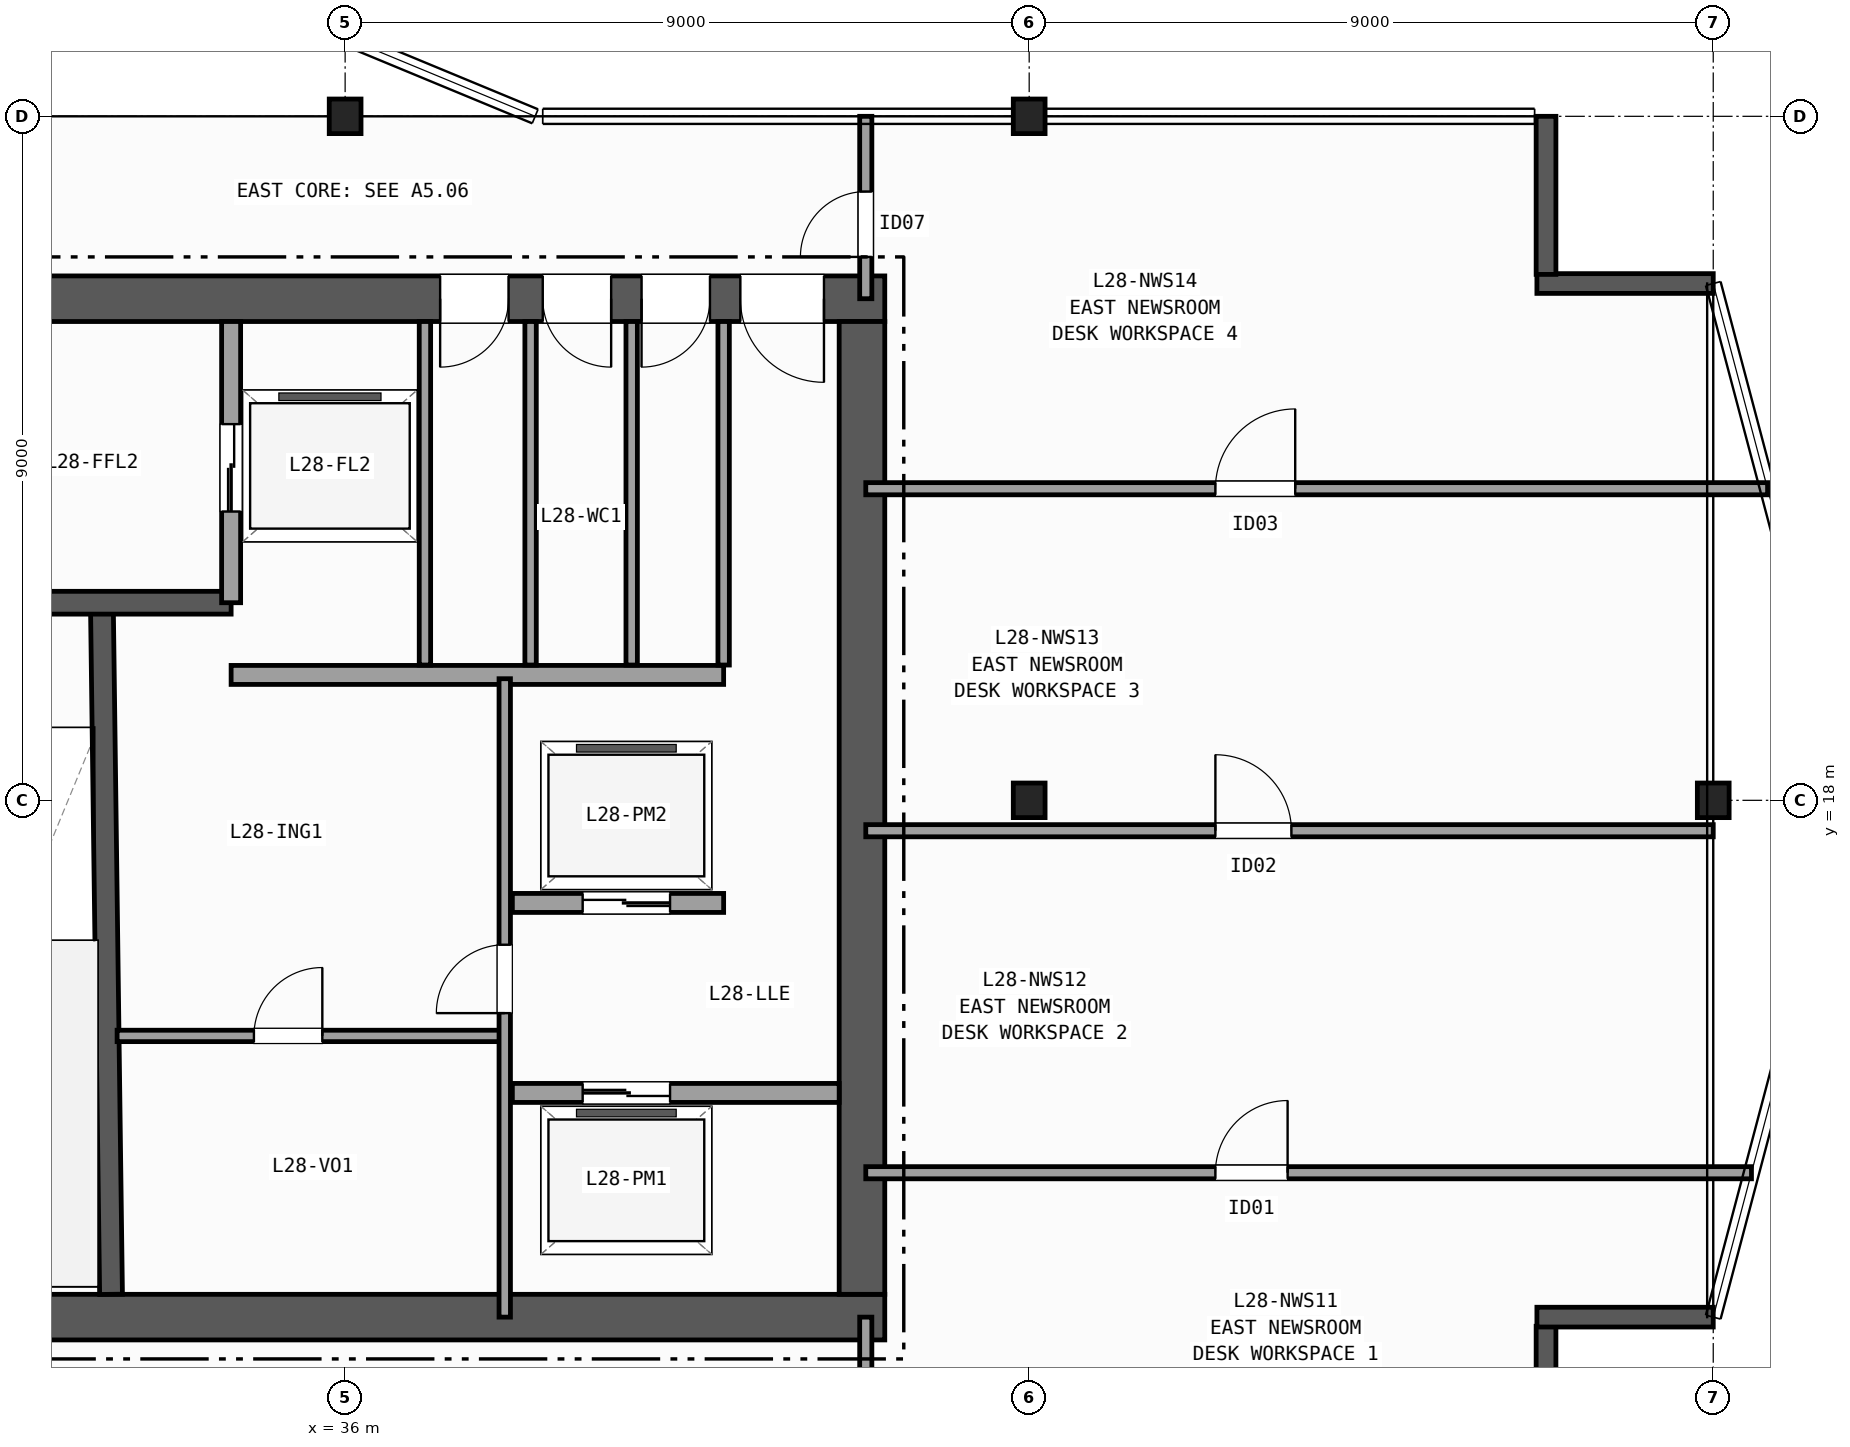
"""IFC4 building model, lengths in metres.
Left out: names, types, materials, properties, quantities, classifications, styles, units other than length and angle.
Written with IfcOpenShell. Run it as: python <this file> out.ifc"""

import sys

from ifc_helpers import new_model, si_unit, direction, frame, frame_2d, origin, origin_2d, place, context, subcontext, project, spatial, rectangle, i_section, extrude, element, fill, save


model = new_model("IFC4")
c1 = context("Model", 3, precision=1e-05, world=origin(), true_north=direction((0.0, 1.0)))
c2 = subcontext(c1, "Body", "Model", "MODEL_VIEW")
j1 = project(units=[si_unit("LENGTHUNIT", "METRE"), si_unit("PLANEANGLEUNIT", "RADIAN")], contexts=[c1])
p1 = place(None, origin())
s1 = spatial("IfcSite", under=j1, at=p1, CompositionType="ELEMENT")
p2 = place(p1, origin())
s2 = spatial("IfcBuilding", under=s1, at=p2, CompositionType="ELEMENT")
p3 = place(p2, frame((0.0, 0.0, 117.4)))
s3 = spatial("IfcBuildingStorey", under=s2, at=p3, CompositionType="ELEMENT", Elevation=117.4)
for number, where, z_axis, x_axis in (
    (1, (36.0, 27.0, 0.0), (0.0, 0.0, 1.0), (1.0, 0.0, 0.0)),
    (2, (45.0, 18.0, 0.0), (0.0, 0.0, 1.0), (1.0, 0.0, 0.0)),
    (3, (45.0, 27.0, 0.0), (0.0, 0.0, 1.0), (1.0, 0.0, 0.0)),
    (4, (54.0, 18.0, 0.0), (0.0, 0.0, 1.0), (1.0, 0.0, 0.0)),
):
    element("IfcColumn", number, at=place(p3, frame(where, z_axis=z_axis, x_axis=x_axis)), inside=s3, PredefinedType="COLUMN", context=c2, shape_type="SweptSolid", body=[
        extrude(i_section(OverallWidth=0.418, OverallDepth=0.455, WebThickness=0.042, FlangeThickness=0.068, FilletRadius=0.015, at=origin_2d()), origin(), (0.0, 0.0, 1.0), 3.7),
    ])
p4 = place(p3, frame((51.8, 9.0, 0.0), z_axis=(0.0, 0.0, 1.0), x_axis=(0.0, 1.0, 0.0)))
e5 = element("IfcWall", 5, at=p4, inside=s3, PredefinedType="SOLIDWALL", context=c2, shape_type="SweptSolid", body=[
    extrude(rectangle(XDim=2.08, YDim=0.26, at=frame_2d((1.04, 0.0))), origin(), (0.0, 0.0, 1.0), 3.42),
])
for number, where, z_axis, x_axis in (
    (6, (51.68, 11.2, 0.0), (0.0, 0.0, 1.0), (1.0, 0.0, 0.0)),
    (7, (54.0, 24.8, 0.0), (0.0, 0.0, 1.0), (-1.0, 0.0, 0.0)),
):
    element("IfcWall", number, at=place(p3, frame(where, z_axis=z_axis, x_axis=x_axis)), inside=s3, PredefinedType="SOLIDWALL", context=c2, shape_type="SweptSolid", body=[
        extrude(rectangle(XDim=2.32, YDim=0.26, at=frame_2d((1.16, 0.0))), origin(), (0.0, 0.0, 1.0), 3.42),
    ])
p5 = place(p3, frame((51.8, 24.92, 0.0), z_axis=(0.0, 0.0, 1.0), x_axis=(0.0, 1.0, 0.0)))
e8 = element("IfcWall", 8, at=p5, inside=s3, PredefinedType="SOLIDWALL", context=c2, shape_type="SweptSolid", body=[
    extrude(rectangle(XDim=2.08, YDim=0.26, at=frame_2d((1.04, 0.0))), origin(), (0.0, 0.0, 1.0), 3.42),
])
p6 = place(p3, frame((29.1, 11.2, 0.0), z_axis=(0.0, 0.0, 1.0), x_axis=(1.0, 0.0, 0.0)))
e9 = element("IfcWall", 9, at=p6, inside=s3, PredefinedType="SHEAR", context=c2, shape_type="SweptSolid", body=[
    extrude(rectangle(XDim=14.0, YDim=0.6, at=frame_2d((7.0, 0.0))), origin(), (0.0, 0.0, 1.0), 3.42),
])
p7 = place(p3, frame((43.1, 24.6, 0.0), z_axis=(0.0, 0.0, 1.0), x_axis=(-1.0, 0.0, 0.0)))
e10 = element("IfcWall", 10, at=p7, inside=s3, PredefinedType="SHEAR", context=c2, shape_type="SweptSolid", body=[
    extrude(rectangle(XDim=14.0, YDim=0.6, at=frame_2d((7.0, 0.0))), origin(), (0.0, 0.0, 1.0), 3.42),
])
p8 = place(p7, frame((0.8, 0.0, 0.0)))
e11 = element("IfcOpeningElement", 11, at=p8, cuts=e10, PredefinedType="OPENING", context=c2, shape_type="SweptSolid", body=[
    extrude(rectangle(XDim=1.1, YDim=2.15, at=frame_2d((0.55, 1.075))), frame((0.0, 0.31, 0.0), z_axis=(0.0, -1.0, 0.0), x_axis=(1.0, 0.0, 0.0)), (0.0, 0.0, 1.0), 0.62),
])
p9 = place(p7, frame((2.3, 0.0, 0.0)))
e12 = element("IfcOpeningElement", 12, at=p9, cuts=e10, PredefinedType="OPENING", context=c2, shape_type="SweptSolid", body=[
    extrude(rectangle(XDim=0.9, YDim=2.1, at=frame_2d((0.45, 1.05))), frame((0.0, 0.31, 0.0), z_axis=(0.0, -1.0, 0.0), x_axis=(1.0, 0.0, 0.0)), (0.0, 0.0, 1.0), 0.62),
])
p10 = place(p7, frame((3.6, 0.0, 0.0)))
e13 = element("IfcOpeningElement", 13, at=p10, cuts=e10, PredefinedType="OPENING", context=c2, shape_type="SweptSolid", body=[
    extrude(rectangle(XDim=0.9, YDim=2.1, at=frame_2d((0.45, 1.05))), frame((0.0, 0.31, 0.0), z_axis=(0.0, -1.0, 0.0), x_axis=(1.0, 0.0, 0.0)), (0.0, 0.0, 1.0), 0.62),
])
p11 = place(p7, frame((4.95, 0.0, 0.0)))
e14 = element("IfcOpeningElement", 14, at=p11, cuts=e10, PredefinedType="OPENING", context=c2, shape_type="SweptSolid", body=[
    extrude(rectangle(XDim=0.9, YDim=2.1, at=frame_2d((0.45, 1.05))), frame((0.0, 0.31, 0.0), z_axis=(0.0, -1.0, 0.0), x_axis=(1.0, 0.0, 0.0)), (0.0, 0.0, 1.0), 0.62),
])
p12 = place(p3, frame((42.8, 11.5, 0.0), z_axis=(0.0, 0.0, 1.0), x_axis=(0.0, 1.0, 0.0)))
e15 = element("IfcWall", 15, at=p12, inside=s3, PredefinedType="SHEAR", context=c2, shape_type="SweptSolid", body=[
    extrude(rectangle(XDim=12.8, YDim=0.6, at=frame_2d((6.4, 0.0))), origin(), (0.0, 0.0, 1.0), 3.42),
])
p13 = place(p3, frame((32.92, 11.5, 0.0), z_axis=(0.0, 0.0, 1.0), x_axis=(-0.013244407292, 0.999912288991, 0.0)))
e16 = element("IfcWall", 16, at=p13, inside=s3, PredefinedType="SHEAR", context=c2, shape_type="SweptSolid", body=[
    extrude(rectangle(XDim=9.051, YDim=0.3, at=frame_2d((4.525, 0.0))), origin(), (0.0, 0.0, 1.0), 3.42),
])
p14 = place(p3, frame((34.5, 20.6, 0.0), z_axis=(0.0, 0.0, 1.0), x_axis=(-1.0, 0.0, 0.0)))
e17 = element("IfcWall", 17, at=p14, inside=s3, PredefinedType="SHEAR", context=c2, shape_type="SweptSolid", body=[
    extrude(rectangle(XDim=4.8, YDim=0.3, at=frame_2d((2.4, 0.0))), origin(), (0.0, 0.0, 1.0), 3.42),
])
p15 = place(p14, frame((2.7, 0.0, 0.0)))
e18 = element("IfcOpeningElement", 18, at=p15, cuts=e17, PredefinedType="OPENING", context=c2, shape_type="SweptSolid", body=[
    extrude(rectangle(XDim=1.2, YDim=2.15, at=frame_2d((0.6, 1.075))), frame((0.0, 0.16, 0.0), z_axis=(0.0, -1.0, 0.0), x_axis=(1.0, 0.0, 0.0)), (0.0, 0.0, 1.0), 0.32),
])
p16 = place(p3, frame((34.5, 20.6, 0.0), z_axis=(0.0, 0.0, 1.0), x_axis=(0.0, 1.0, 0.0)))
e19 = element("IfcWall", 19, at=p16, inside=s3, PredefinedType="PARTITIONING", context=c2, shape_type="SweptSolid", body=[
    extrude(rectangle(XDim=3.7, YDim=0.25, at=frame_2d((1.85, 0.0))), origin(), (0.0, 0.0, 1.0), 3.42),
])
p17 = place(p16, frame((1.2, 0.0, 0.0)))
e20 = element("IfcOpeningElement", 20, at=p17, cuts=e19, PredefinedType="OPENING", context=c2, shape_type="SweptSolid", body=[
    extrude(rectangle(XDim=1.15, YDim=2.15, at=frame_2d((0.575, 1.075))), frame((0.0, 0.135, 0.0), z_axis=(0.0, -1.0, 0.0), x_axis=(1.0, 0.0, 0.0)), (0.0, 0.0, 1.0), 0.27),
])
p18 = place(p3, frame((34.5, 19.65, 0.0), z_axis=(0.0, 0.0, 1.0), x_axis=(1.0, 0.0, 0.0)))
e21 = element("IfcWall", 21, at=p18, inside=s3, PredefinedType="PARTITIONING", context=c2, shape_type="SweptSolid", body=[
    extrude(rectangle(XDim=6.48, YDim=0.25, at=frame_2d((3.24, 0.0))), origin(), (0.0, 0.0, 1.0), 3.42),
])
p19 = place(p3, frame((38.2, 14.15, 0.0), z_axis=(0.0, 0.0, 1.0), x_axis=(1.0, 0.0, 0.0)))
e22 = element("IfcWall", 22, at=p19, inside=s3, PredefinedType="PARTITIONING", context=c2, shape_type="SweptSolid", body=[
    extrude(rectangle(XDim=4.3, YDim=0.25, at=frame_2d((2.15, 0.0))), origin(), (0.0, 0.0, 1.0), 3.42),
])
p20 = place(p19, frame((0.925, 0.0, 0.0)))
e23 = element("IfcOpeningElement", 23, at=p20, cuts=e22, PredefinedType="OPENING", context=c2, shape_type="SweptSolid", body=[
    extrude(rectangle(XDim=1.15, YDim=2.15, at=frame_2d((0.575, 1.075))), frame((0.0, 0.135, 0.0), z_axis=(0.0, -1.0, 0.0), x_axis=(1.0, 0.0, 0.0)), (0.0, 0.0, 1.0), 0.27),
])
p21 = place(p3, frame((40.98, 16.65, 0.0), z_axis=(0.0, 0.0, 1.0), x_axis=(-1.0, 0.0, 0.0)))
e24 = element("IfcWall", 24, at=p21, inside=s3, PredefinedType="PARTITIONING", context=c2, shape_type="SweptSolid", body=[
    extrude(rectangle(XDim=2.78, YDim=0.25, at=frame_2d((1.39, 0.0))), origin(), (0.0, 0.0, 1.0), 3.42),
])
p22 = place(p21, frame((0.705, 0.0, 0.0)))
e25 = element("IfcOpeningElement", 25, at=p22, cuts=e24, PredefinedType="OPENING", context=c2, shape_type="SweptSolid", body=[
    extrude(rectangle(XDim=1.15, YDim=2.15, at=frame_2d((0.575, 1.075))), frame((0.0, 0.135, 0.0), z_axis=(0.0, -1.0, 0.0), x_axis=(1.0, 0.0, 0.0)), (0.0, 0.0, 1.0), 0.27),
])
p23 = place(p3, frame((33.0, 14.9, 0.0), z_axis=(0.0, 0.0, 1.0), x_axis=(1.0, 0.0, 0.0)))
e26 = element("IfcWall", 26, at=p23, inside=s3, PredefinedType="PARTITIONING", context=c2, shape_type="SweptSolid", body=[
    extrude(rectangle(XDim=5.1, YDim=0.15, at=frame_2d((2.55, 0.0))), origin(), (0.0, 0.0, 1.0), 3.42),
])
p24 = place(p23, frame((1.8, 0.0, 0.0)))
e27 = element("IfcOpeningElement", 27, at=p24, cuts=e26, PredefinedType="OPENING", context=c2, shape_type="SweptSolid", body=[
    extrude(rectangle(XDim=0.9, YDim=2.1, at=frame_2d((0.45, 1.05))), frame((0.0, 0.085, 0.0), z_axis=(0.0, -1.0, 0.0), x_axis=(1.0, 0.0, 0.0)), (0.0, 0.0, 1.0), 0.17),
])
p25 = place(p3, frame((38.1, 11.2, 0.0), z_axis=(0.0, 0.0, 1.0), x_axis=(0.0, 1.0, 0.0)))
e28 = element("IfcWall", 28, at=p25, inside=s3, PredefinedType="PARTITIONING", context=c2, shape_type="SweptSolid", body=[
    extrude(rectangle(XDim=8.4, YDim=0.15, at=frame_2d((4.2, 0.0))), origin(), (0.0, 0.0, 1.0), 3.42),
])
p26 = place(p25, frame((4.0, 0.0, 0.0)))
e29 = element("IfcOpeningElement", 29, at=p26, cuts=e28, PredefinedType="OPENING", context=c2, shape_type="SweptSolid", body=[
    extrude(rectangle(XDim=0.9, YDim=2.1, at=frame_2d((0.45, 1.05))), frame((0.0, 0.085, 0.0), z_axis=(0.0, -1.0, 0.0), x_axis=(1.0, 0.0, 0.0)), (0.0, 0.0, 1.0), 0.17),
])
for number, where, z_axis, x_axis in (
    (30, (37.05, 19.78, 0.0), (0.0, 0.0, 1.0), (0.0, 1.0, 0.0)),
    (31, (38.44, 19.78, 0.0), (0.0, 0.0, 1.0), (0.0, 1.0, 0.0)),
    (32, (39.77, 19.78, 0.0), (0.0, 0.0, 1.0), (0.0, 1.0, 0.0)),
    (33, (40.98, 19.78, 0.0), (0.0, 0.0, 1.0), (0.0, 1.0, 0.0)),
):
    element("IfcWall", number, at=place(p3, frame(where, z_axis=z_axis, x_axis=x_axis)), inside=s3, PredefinedType="PARTITIONING", context=c2, shape_type="SweptSolid", body=[
        extrude(rectangle(XDim=4.52, YDim=0.15, at=frame_2d((2.26, 0.0))), origin(), (0.0, 0.0, 1.0), 3.42),
    ])
p27 = place(p3, frame((42.85, 9.0, 0.0), z_axis=(0.0, 0.0, 1.0), x_axis=(0.0, 1.0, 0.0)))
e34 = element("IfcWall", 34, at=p27, inside=s3, PredefinedType="PARTITIONING", context=c2, shape_type="SweptSolid", body=[
    extrude(rectangle(XDim=2.2, YDim=0.16, at=frame_2d((1.1, 0.0))), origin(), (0.0, 0.0, 1.0), 2.634),
])
p28 = place(p3, frame((42.85, 24.6, 0.0), z_axis=(0.0, 0.0, 1.0), x_axis=(0.0, 1.0, 0.0)))
e35 = element("IfcWall", 35, at=p28, inside=s3, PredefinedType="PARTITIONING", context=c2, shape_type="SweptSolid", body=[
    extrude(rectangle(XDim=2.4, YDim=0.16, at=frame_2d((1.2, 0.0))), origin(), (0.0, 0.0, 1.0), 2.634),
])
p29 = place(p28, frame((0.55, 0.0, 0.0)))
e36 = element("IfcOpeningElement", 36, at=p29, cuts=e35, PredefinedType="OPENING", context=c2, shape_type="SweptSolid", body=[
    extrude(rectangle(XDim=0.86, YDim=2.05, at=frame_2d((0.43, 1.025))), frame((0.0, 0.09, 0.0), z_axis=(0.0, -1.0, 0.0), x_axis=(1.0, 0.0, 0.0)), (0.0, 0.0, 1.0), 0.18),
])
p30 = place(p3, frame((42.85, 13.1, 0.0), z_axis=(0.0, 0.0, 1.0), x_axis=(1.0, 0.0, 0.0)))
e37 = element("IfcWall", 37, at=p30, inside=s3, PredefinedType="PARTITIONING", context=c2, shape_type="SweptSolid", body=[
    extrude(rectangle(XDim=11.653, YDim=0.16, at=frame_2d((5.826, 0.0))), origin(), (0.0, 0.0, 1.0), 3.42),
])
p31 = place(p30, frame((4.6, 0.0, 0.0)))
e38 = element("IfcOpeningElement", 38, at=p31, cuts=e37, PredefinedType="OPENING", context=c2, shape_type="SweptSolid", body=[
    extrude(rectangle(XDim=0.95, YDim=2.1, at=frame_2d((0.475, 1.05))), frame((0.0, 0.09, 0.0), z_axis=(0.0, -1.0, 0.0), x_axis=(1.0, 0.0, 0.0)), (0.0, 0.0, 1.0), 0.18),
])
p32 = place(p3, frame((42.85, 17.6, 0.0), z_axis=(0.0, 0.0, 1.0), x_axis=(1.0, 0.0, 0.0)))
e39 = element("IfcWall", 39, at=p32, inside=s3, PredefinedType="PARTITIONING", context=c2, shape_type="SweptSolid", body=[
    extrude(rectangle(XDim=11.15, YDim=0.16, at=frame_2d((5.575, 0.0))), origin(), (0.0, 0.0, 1.0), 3.42),
])
p33 = place(p32, frame((4.6, 0.0, 0.0)))
e40 = element("IfcOpeningElement", 40, at=p33, cuts=e39, PredefinedType="OPENING", context=c2, shape_type="SweptSolid", body=[
    extrude(rectangle(XDim=1.0, YDim=2.1, at=frame_2d((0.5, 1.05))), frame((0.0, 0.09, 0.0), z_axis=(0.0, -1.0, 0.0), x_axis=(1.0, 0.0, 0.0)), (0.0, 0.0, 1.0), 0.18),
])
p34 = place(p3, frame((42.85, 22.1, 0.0), z_axis=(0.0, 0.0, 1.0), x_axis=(1.0, 0.0, 0.0)))
e41 = element("IfcWall", 41, at=p34, inside=s3, PredefinedType="PARTITIONING", context=c2, shape_type="SweptSolid", body=[
    extrude(rectangle(XDim=11.865, YDim=0.16, at=frame_2d((5.933, 0.0))), origin(), (0.0, 0.0, 1.0), 3.42),
])
p35 = place(p34, frame((4.6, 0.0, 0.0)))
e42 = element("IfcOpeningElement", 42, at=p35, cuts=e41, PredefinedType="OPENING", context=c2, shape_type="SweptSolid", body=[
    extrude(rectangle(XDim=1.05, YDim=2.15, at=frame_2d((0.525, 1.075))), frame((0.0, 0.09, 0.0), z_axis=(0.0, -1.0, 0.0), x_axis=(1.0, 0.0, 0.0)), (0.0, 0.0, 1.0), 0.18),
])
p36 = place(p8, origin())
e43 = element("IfcDoor", 43, at=p36, inside=s3, OperationType="SINGLE_SWING_LEFT", PredefinedType="DOOR", context=c2, shape_type="SweptSolid", body=[
    extrude(rectangle(XDim=1.1, YDim=2.15, at=frame_2d((0.55, 1.075))), frame((0.0, 0.025, 0.0), z_axis=(0.0, -1.0, 0.0), x_axis=(1.0, 0.0, 0.0)), (0.0, 0.0, 1.0), 0.05),
])
fill(e11, e43)
p37 = place(p9, origin())
e44 = element("IfcDoor", 44, at=p37, inside=s3, OperationType="SINGLE_SWING_RIGHT", PredefinedType="DOOR", context=c2, shape_type="SweptSolid", body=[
    extrude(rectangle(XDim=0.9, YDim=2.1, at=frame_2d((0.45, 1.05))), frame((0.0, 0.025, 0.0), z_axis=(0.0, -1.0, 0.0), x_axis=(1.0, 0.0, 0.0)), (0.0, 0.0, 1.0), 0.05),
])
fill(e12, e44)
p38 = place(p10, origin())
e45 = element("IfcDoor", 45, at=p38, inside=s3, OperationType="SINGLE_SWING_LEFT", PredefinedType="DOOR", context=c2, shape_type="SweptSolid", body=[
    extrude(rectangle(XDim=0.9, YDim=2.1, at=frame_2d((0.45, 1.05))), frame((0.0, 0.025, 0.0), z_axis=(0.0, -1.0, 0.0), x_axis=(1.0, 0.0, 0.0)), (0.0, 0.0, 1.0), 0.05),
])
fill(e13, e45)
p39 = place(p11, origin())
e46 = element("IfcDoor", 46, at=p39, inside=s3, OperationType="SINGLE_SWING_RIGHT", PredefinedType="DOOR", context=c2, shape_type="SweptSolid", body=[
    extrude(rectangle(XDim=0.9, YDim=2.1, at=frame_2d((0.45, 1.05))), frame((0.0, 0.025, 0.0), z_axis=(0.0, -1.0, 0.0), x_axis=(1.0, 0.0, 0.0)), (0.0, 0.0, 1.0), 0.05),
])
fill(e14, e46)
p40 = place(p17, origin())
e47 = element("IfcDoor", 47, at=p40, inside=s3, OperationType="DOUBLE_DOOR_SLIDING", PredefinedType="DOOR", context=c2, shape_type="SweptSolid", body=[
    extrude(rectangle(XDim=1.15, YDim=2.15, at=frame_2d((0.575, 1.075))), frame((0.0, 0.025, 0.0), z_axis=(0.0, -1.0, 0.0), x_axis=(1.0, 0.0, 0.0)), (0.0, 0.0, 1.0), 0.05),
])
fill(e20, e47)
p41 = place(p20, origin())
e48 = element("IfcDoor", 48, at=p41, inside=s3, OperationType="DOUBLE_DOOR_SLIDING", PredefinedType="DOOR", context=c2, shape_type="SweptSolid", body=[
    extrude(rectangle(XDim=1.15, YDim=2.15, at=frame_2d((0.575, 1.075))), frame((0.0, 0.025, 0.0), z_axis=(0.0, -1.0, 0.0), x_axis=(1.0, 0.0, 0.0)), (0.0, 0.0, 1.0), 0.05),
])
fill(e23, e48)
p42 = place(p22, origin())
e49 = element("IfcDoor", 49, at=p42, inside=s3, OperationType="DOUBLE_DOOR_SLIDING", PredefinedType="DOOR", context=c2, shape_type="SweptSolid", body=[
    extrude(rectangle(XDim=1.15, YDim=2.15, at=frame_2d((0.575, 1.075))), frame((0.0, 0.025, 0.0), z_axis=(0.0, -1.0, 0.0), x_axis=(1.0, 0.0, 0.0)), (0.0, 0.0, 1.0), 0.05),
])
fill(e25, e49)
p43 = place(p26, origin())
e50 = element("IfcDoor", 50, at=p43, inside=s3, OperationType="SINGLE_SWING_LEFT", PredefinedType="DOOR", context=c2, shape_type="SweptSolid", body=[
    extrude(rectangle(XDim=0.9, YDim=2.1, at=frame_2d((0.45, 1.05))), frame((0.0, 0.025, 0.0), z_axis=(0.0, -1.0, 0.0), x_axis=(1.0, 0.0, 0.0)), (0.0, 0.0, 1.0), 0.05),
])
fill(e29, e50)
p44 = place(p24, origin())
e51 = element("IfcDoor", 51, at=p44, inside=s3, OperationType="SINGLE_SWING_RIGHT", PredefinedType="DOOR", context=c2, shape_type="SweptSolid", body=[
    extrude(rectangle(XDim=0.9, YDim=2.1, at=frame_2d((0.45, 1.05))), frame((0.0, 0.025, 0.0), z_axis=(0.0, -1.0, 0.0), x_axis=(1.0, 0.0, 0.0)), (0.0, 0.0, 1.0), 0.05),
])
fill(e27, e51)
p45 = place(p29, origin())
e52 = element("IfcDoor", 52, at=p45, inside=s3, OperationType="SINGLE_SWING_LEFT", PredefinedType="DOOR", context=c2, shape_type="SweptSolid", body=[
    extrude(rectangle(XDim=0.86, YDim=2.05, at=frame_2d((0.43, 1.025))), frame((0.0, 0.025, 0.0), z_axis=(0.0, -1.0, 0.0), x_axis=(1.0, 0.0, 0.0)), (0.0, 0.0, 1.0), 0.05),
])
fill(e36, e52)
p46 = place(p31, origin())
e53 = element("IfcDoor", 53, at=p46, inside=s3, OperationType="SINGLE_SWING_RIGHT", PredefinedType="DOOR", context=c2, shape_type="SweptSolid", body=[
    extrude(rectangle(XDim=0.95, YDim=2.1, at=frame_2d((0.475, 1.05))), frame((0.0, 0.025, 0.0), z_axis=(0.0, -1.0, 0.0), x_axis=(1.0, 0.0, 0.0)), (0.0, 0.0, 1.0), 0.05),
])
fill(e38, e53)
p47 = place(p33, origin())
e54 = element("IfcDoor", 54, at=p47, inside=s3, OperationType="SINGLE_SWING_LEFT", PredefinedType="DOOR", context=c2, shape_type="SweptSolid", body=[
    extrude(rectangle(XDim=1.0, YDim=2.1, at=frame_2d((0.5, 1.05))), frame((0.0, 0.025, 0.0), z_axis=(0.0, -1.0, 0.0), x_axis=(1.0, 0.0, 0.0)), (0.0, 0.0, 1.0), 0.05),
])
fill(e40, e54)
p48 = place(p35, origin())
e55 = element("IfcDoor", 55, at=p48, inside=s3, OperationType="SINGLE_SWING_RIGHT", PredefinedType="DOOR", context=c2, shape_type="SweptSolid", body=[
    extrude(rectangle(XDim=1.05, YDim=2.15, at=frame_2d((0.525, 1.075))), frame((0.0, 0.025, 0.0), z_axis=(0.0, -1.0, 0.0), x_axis=(1.0, 0.0, 0.0)), (0.0, 0.0, 1.0), 0.05),
])
fill(e42, e55)
save(model, sys.argv[1])
